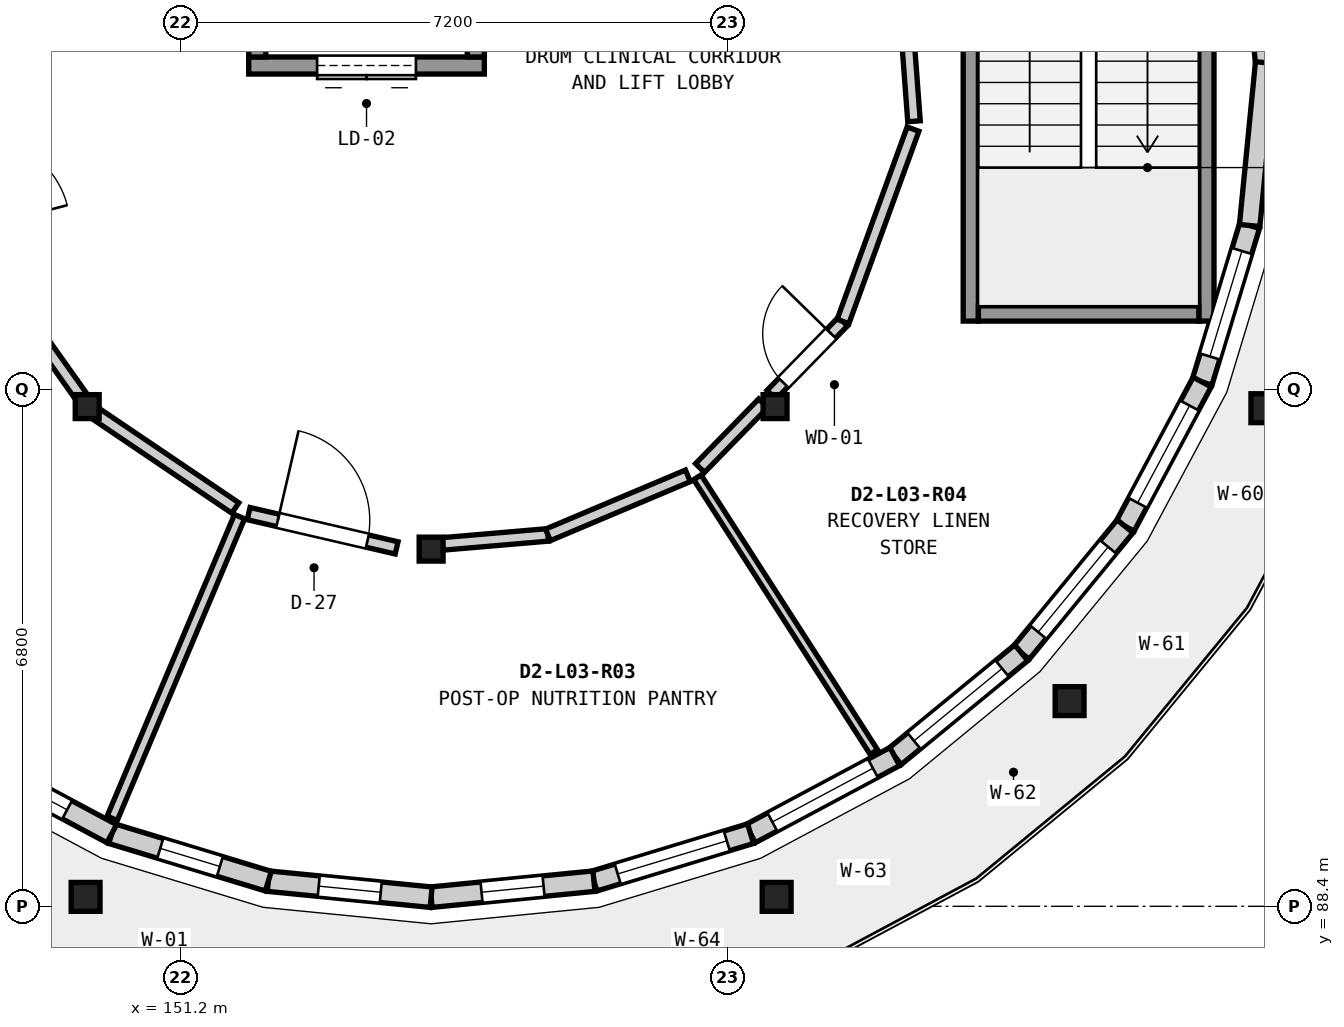
"""IFC4 building model, lengths in metres.
Left out: names, types, materials, properties, quantities, classifications, styles, units other than length and angle.
Written with IfcOpenShell. Run it as: python <this file> out.ifc"""

import sys

from ifc_helpers import new_model, si_unit, direction, frame, frame_2d, origin, origin_2d, place, context, subcontext, project, spatial, rectangle, circle, extrude, element, fill, save


model = new_model("IFC4")
c1 = context("Model", 3, precision=1e-05, world=origin(), true_north=direction((0.0, 1.0)))
c2 = subcontext(c1, "Body", "Model", "MODEL_VIEW")
j1 = project(units=[si_unit("LENGTHUNIT", "METRE"), si_unit("PLANEANGLEUNIT", "RADIAN")], contexts=[c1])
p1 = place(None, origin())
s1 = spatial("IfcSite", under=j1, at=p1, CompositionType="ELEMENT")
p2 = place(p1, origin())
s2 = spatial("IfcBuilding", under=s1, at=p2, CompositionType="ELEMENT")
p3 = place(p2, frame((0.0, 0.0, 12.95)))
s3 = spatial("IfcBuildingStorey", under=s2, at=p3, CompositionType="ELEMENT", Elevation=12.95)
for number, where, z_axis, x_axis in (
    (1, (149.954, 88.524, 0.0), (0.0, 0.0, 1.0), (1.0, 0.0, 0.0)),
    (2, (159.046, 88.524, 0.0), (0.0, 0.0, 1.0), (1.0, 0.0, 0.0)),
    (3, (162.9, 91.1, 0.0), (0.0, 0.0, 1.0), (1.0, 0.0, 0.0)),
    (4, (165.476, 94.954, 0.0), (0.0, 0.0, 1.0), (1.0, 0.0, 0.0)),
):
    element("IfcColumn", number, at=place(p3, frame(where, z_axis=z_axis, x_axis=x_axis)), inside=s3, PredefinedType="PILASTER", context=c2, shape_type="SweptSolid", body=[
        extrude(circle(Radius=0.19, at=origin_2d()), origin(), (0.0, 0.0, 1.0), 4.2),
    ])
for number, where, z_axis, x_axis in (
    (5, (149.975, 94.975, 0.0), (0.0, 0.0, 1.0), (1.0, 0.0, 0.0)),
    (6, (154.5, 93.1, 0.0), (0.0, 0.0, 1.0), (1.0, 0.0, 0.0)),
    (7, (159.025, 94.975, 0.0), (0.0, 0.0, 1.0), (1.0, 0.0, 0.0)),
):
    element("IfcColumn", number, at=place(p3, frame(where, z_axis=z_axis, x_axis=x_axis)), inside=s3, PredefinedType="COLUMN", context=c2, shape_type="SweptSolid", body=[
        extrude(rectangle(XDim=0.315, YDim=0.315, at=origin_2d()), origin(), (0.0, 0.0, 1.0), 4.2),
    ])
p4 = place(p3, frame((165.269, 97.358, 0.0), z_axis=(0.0, 0.0, 1.0), x_axis=(-0.290353644083, -0.95691941216, 0.0)))
e8 = element("IfcWall", 8, at=p4, inside=s3, PredefinedType="ELEMENTEDWALL", context=c2, shape_type="SweptSolid", body=[
    extrude(rectangle(XDim=2.153, YDim=0.27, at=frame_2d((1.076, 0.0))), origin(), (0.0, 0.0, 1.0), 3.314),
])
p5 = place(p4, frame((0.351, 0.0, 0.85)))
e9 = element("IfcOpeningElement", 9, at=p5, cuts=e8, PredefinedType="OPENING", context=c2, shape_type="SweptSolid", body=[
    extrude(rectangle(XDim=1.45, YDim=1.45, at=frame_2d((0.725, 0.725))), frame((0.0, 0.145, 0.0), z_axis=(0.0, -1.0, 0.0), x_axis=(1.0, 0.0, 0.0)), (0.0, 0.0, 1.0), 0.29),
])
p6 = place(p3, frame((164.644, 95.298, 0.0), z_axis=(0.0, 0.0, 1.0), x_axis=(-0.471235784617, -0.882007276215, 0.0)))
e10 = element("IfcWall", 10, at=p6, inside=s3, PredefinedType="ELEMENTEDWALL", context=c2, shape_type="SweptSolid", body=[
    extrude(rectangle(XDim=2.152, YDim=0.27, at=frame_2d((1.076, 0.0))), origin(), (0.0, 0.0, 1.0), 3.314),
])
p7 = place(p6, frame((0.351, 0.0, 0.85)))
e11 = element("IfcOpeningElement", 11, at=p7, cuts=e10, PredefinedType="OPENING", context=c2, shape_type="SweptSolid", body=[
    extrude(rectangle(XDim=1.45, YDim=1.75, at=frame_2d((0.725, 0.875))), frame((0.0, 0.145, 0.0), z_axis=(0.0, -1.0, 0.0), x_axis=(1.0, 0.0, 0.0)), (0.0, 0.0, 1.0), 0.29),
])
p8 = place(p3, frame((163.63, 93.4, 0.0), z_axis=(0.0, 0.0, 1.0), x_axis=(-0.634533827498, -0.772895091045, 0.0)))
e12 = element("IfcWall", 12, at=p8, inside=s3, PredefinedType="ELEMENTEDWALL", context=c2, shape_type="SweptSolid", body=[
    extrude(rectangle(XDim=2.153, YDim=0.27, at=frame_2d((1.076, 0.0))), origin(), (0.0, 0.0, 1.0), 3.314),
])
p9 = place(p8, frame((0.351, 0.0, 0.85)))
e13 = element("IfcOpeningElement", 13, at=p9, cuts=e12, PredefinedType="OPENING", context=c2, shape_type="SweptSolid", body=[
    extrude(rectangle(XDim=1.45, YDim=2.05, at=frame_2d((0.725, 1.025))), frame((0.0, 0.145, 0.0), z_axis=(0.0, -1.0, 0.0), x_axis=(1.0, 0.0, 0.0)), (0.0, 0.0, 1.0), 0.29),
])
p10 = place(p3, frame((162.264, 91.736, 0.0), z_axis=(0.0, 0.0, 1.0), x_axis=(-0.772895091045, -0.634533827498, 0.0)))
e14 = element("IfcWall", 14, at=p10, inside=s3, PredefinedType="ELEMENTEDWALL", context=c2, shape_type="SweptSolid", body=[
    extrude(rectangle(XDim=2.153, YDim=0.27, at=frame_2d((1.076, 0.0))), origin(), (0.0, 0.0, 1.0), 3.314),
])
p11 = place(p10, frame((0.326, 0.0, 0.85)))
e15 = element("IfcOpeningElement", 15, at=p11, cuts=e14, PredefinedType="OPENING", context=c2, shape_type="SweptSolid", body=[
    extrude(rectangle(XDim=1.5, YDim=1.3, at=frame_2d((0.75, 0.65))), frame((0.0, 0.145, 0.0), z_axis=(0.0, -1.0, 0.0), x_axis=(1.0, 0.0, 0.0)), (0.0, 0.0, 1.0), 0.29),
])
p12 = place(p3, frame((160.6, 90.37, 0.0), z_axis=(0.0, 0.0, 1.0), x_axis=(-0.882007276215, -0.471235784617, 0.0)))
e16 = element("IfcWall", 16, at=p12, inside=s3, PredefinedType="ELEMENTEDWALL", context=c2, shape_type="SweptSolid", body=[
    extrude(rectangle(XDim=2.152, YDim=0.27, at=frame_2d((1.076, 0.0))), origin(), (0.0, 0.0, 1.0), 3.314),
])
p13 = place(p12, frame((0.326, 0.0, 0.85)))
e17 = element("IfcOpeningElement", 17, at=p13, cuts=e16, PredefinedType="OPENING", context=c2, shape_type="SweptSolid", body=[
    extrude(rectangle(XDim=1.5, YDim=1.65, at=frame_2d((0.75, 0.825))), frame((0.0, 0.145, 0.0), z_axis=(0.0, -1.0, 0.0), x_axis=(1.0, 0.0, 0.0)), (0.0, 0.0, 1.0), 0.29),
])
p14 = place(p3, frame((158.702, 89.356, 0.0), z_axis=(0.0, 0.0, 1.0), x_axis=(-0.95691941216, -0.290353644083, 0.0)))
e18 = element("IfcWall", 18, at=p14, inside=s3, PredefinedType="ELEMENTEDWALL", context=c2, shape_type="SweptSolid", body=[
    extrude(rectangle(XDim=2.153, YDim=0.27, at=frame_2d((1.076, 0.0))), origin(), (0.0, 0.0, 1.0), 3.314),
])
p15 = place(p14, frame((0.326, 0.0, 0.85)))
e19 = element("IfcOpeningElement", 19, at=p15, cuts=e18, PredefinedType="OPENING", context=c2, shape_type="SweptSolid", body=[
    extrude(rectangle(XDim=1.5, YDim=1.95, at=frame_2d((0.75, 0.975))), frame((0.0, 0.145, 0.0), z_axis=(0.0, -1.0, 0.0), x_axis=(1.0, 0.0, 0.0)), (0.0, 0.0, 1.0), 0.29),
])
p16 = place(p3, frame((156.642, 88.731, 0.0), z_axis=(0.0, 0.0, 1.0), x_axis=(-0.995186536277, -0.097998765368, 0.0)))
e20 = element("IfcWall", 20, at=p16, inside=s3, PredefinedType="ELEMENTEDWALL", context=c2, shape_type="SweptSolid", body=[
    extrude(rectangle(XDim=2.152, YDim=0.27, at=frame_2d((1.076, 0.0))), origin(), (0.0, 0.0, 1.0), 3.314),
])
p17 = place(p16, frame((0.666, 0.0, 0.85)))
e21 = element("IfcOpeningElement", 21, at=p17, cuts=e20, PredefinedType="OPENING", context=c2, shape_type="SweptSolid", body=[
    extrude(rectangle(XDim=0.82, YDim=1.45, at=frame_2d((0.41, 0.725))), frame((0.0, 0.145, 0.0), z_axis=(0.0, -1.0, 0.0), x_axis=(1.0, 0.0, 0.0)), (0.0, 0.0, 1.0), 0.29),
])
p18 = place(p3, frame((154.5, 88.52, 0.0), z_axis=(0.0, 0.0, 1.0), x_axis=(-0.995186536277, 0.097998765368, 0.0)))
e22 = element("IfcWall", 22, at=p18, inside=s3, PredefinedType="ELEMENTEDWALL", context=c2, shape_type="SweptSolid", body=[
    extrude(rectangle(XDim=2.152, YDim=0.27, at=frame_2d((1.076, 0.0))), origin(), (0.0, 0.0, 1.0), 3.314),
])
p19 = place(p18, frame((0.666, 0.0, 0.85)))
e23 = element("IfcOpeningElement", 23, at=p19, cuts=e22, PredefinedType="OPENING", context=c2, shape_type="SweptSolid", body=[
    extrude(rectangle(XDim=0.82, YDim=1.45, at=frame_2d((0.41, 0.725))), frame((0.0, 0.145, 0.0), z_axis=(0.0, -1.0, 0.0), x_axis=(1.0, 0.0, 0.0)), (0.0, 0.0, 1.0), 0.29),
])
p20 = place(p3, frame((152.358, 88.731, 0.0), z_axis=(0.0, 0.0, 1.0), x_axis=(-0.95691941216, 0.290353644083, 0.0)))
e24 = element("IfcWall", 24, at=p20, inside=s3, PredefinedType="ELEMENTEDWALL", context=c2, shape_type="SweptSolid", body=[
    extrude(rectangle(XDim=2.153, YDim=0.27, at=frame_2d((1.076, 0.0))), origin(), (0.0, 0.0, 1.0), 3.314),
])
p21 = place(p20, frame((0.666, 0.0, 0.85)))
e25 = element("IfcOpeningElement", 25, at=p21, cuts=e24, PredefinedType="OPENING", context=c2, shape_type="SweptSolid", body=[
    extrude(rectangle(XDim=0.82, YDim=1.45, at=frame_2d((0.41, 0.725))), frame((0.0, 0.145, 0.0), z_axis=(0.0, -1.0, 0.0), x_axis=(1.0, 0.0, 0.0)), (0.0, 0.0, 1.0), 0.29),
])
p22 = place(p3, frame((150.298, 89.356, 0.0), z_axis=(0.0, 0.0, 1.0), x_axis=(-0.882007276215, 0.471235784617, 0.0)))
e26 = element("IfcWall", 26, at=p22, inside=s3, PredefinedType="ELEMENTEDWALL", context=c2, shape_type="SweptSolid", body=[
    extrude(rectangle(XDim=2.152, YDim=0.27, at=frame_2d((1.076, 0.0))), origin(), (0.0, 0.0, 1.0), 3.314),
])
p23 = place(p22, frame((0.666, 0.0, 0.85)))
e27 = element("IfcOpeningElement", 27, at=p23, cuts=e26, PredefinedType="OPENING", context=c2, shape_type="SweptSolid", body=[
    extrude(rectangle(XDim=0.82, YDim=1.45, at=frame_2d((0.41, 0.725))), frame((0.0, 0.145, 0.0), z_axis=(0.0, -1.0, 0.0), x_axis=(1.0, 0.0, 0.0)), (0.0, 0.0, 1.0), 0.29),
])
for number, where, z_axis, x_axis in (
    (28, (165.269, 101.642, 0.0), (0.0, 0.0, 1.0), (0.098, -0.995, 0.0)),
    (29, (165.48, 99.5, 0.0), (0.0, 0.0, 1.0), (-0.098, -0.995, 0.0)),
):
    element("IfcWall", number, at=place(p3, frame(where, z_axis=z_axis, x_axis=x_axis)), inside=s3, PredefinedType="ELEMENTEDWALL", context=c2, shape_type="SweptSolid", body=[
        extrude(rectangle(XDim=2.152, YDim=0.27, at=frame_2d((1.076, 0.0))), origin(), (0.0, 0.0, 1.0), 3.314),
    ])
p24 = place(p3, frame((161.6, 102.9, 0.0), z_axis=(0.0, 0.0, 1.0), x_axis=(0.0, -1.0, 0.0)))
e30 = element("IfcWall", 30, at=p24, inside=s3, PredefinedType="SHEAR", context=c2, shape_type="SweptSolid", body=[
    extrude(rectangle(XDim=6.8, YDim=0.2, at=frame_2d((3.4, 0.0))), origin(), (0.0, 0.0, 1.0), 3.96),
])
p25 = place(p24, frame((0.38, 0.0, 0.0)))
e31 = element("IfcOpeningElement", 31, at=p25, cuts=e30, PredefinedType="OPENING", context=c2, shape_type="SweptSolid", body=[
    extrude(rectangle(XDim=1.1, YDim=2.15, at=frame_2d((0.55, 1.075))), frame((0.0, 0.11, 0.0), z_axis=(0.0, -1.0, 0.0), x_axis=(1.0, 0.0, 0.0)), (0.0, 0.0, 1.0), 0.22),
])
p26 = place(p3, frame((164.7, 102.9, 0.0), z_axis=(0.0, 0.0, 1.0), x_axis=(0.0, -1.0, 0.0)))
e32 = element("IfcWall", 32, at=p26, inside=s3, PredefinedType="SHEAR", context=c2, shape_type="SweptSolid", body=[
    extrude(rectangle(XDim=6.8, YDim=0.2, at=frame_2d((3.4, 0.0))), origin(), (0.0, 0.0, 1.0), 3.96),
])
p27 = place(p3, frame((161.7, 96.2, 0.0), z_axis=(0.0, 0.0, 1.0), x_axis=(1.0, 0.0, 0.0)))
e33 = element("IfcWall", 33, at=p27, inside=s3, PredefinedType="SHEAR", context=c2, shape_type="SweptSolid", body=[
    extrude(rectangle(XDim=2.9, YDim=0.2, at=frame_2d((1.45, 0.0))), origin(), (0.0, 0.0, 1.0), 3.96),
])
p28 = place(p3, frame((152.1, 99.463, 0.0), z_axis=(0.0, 0.0, 1.0), x_axis=(1.0, 0.0, 0.0)))
e34 = element("IfcWall", 34, at=p28, inside=s3, PredefinedType="SHEAR", context=c2, shape_type="SweptSolid", body=[
    extrude(rectangle(XDim=3.1, YDim=0.225, at=frame_2d((1.55, 0.0))), origin(), (0.0, 0.0, 1.0), 3.96),
])
p29 = place(p28, frame((0.9, 0.0, 0.0)))
e35 = element("IfcOpeningElement", 35, at=p29, cuts=e34, PredefinedType="OPENING", context=c2, shape_type="SweptSolid", body=[
    extrude(rectangle(XDim=1.3, YDim=2.2, at=frame_2d((0.65, 1.1))), frame((0.0, 0.123, 0.0), z_axis=(0.0, -1.0, 0.0), x_axis=(1.0, 0.0, 0.0)), (0.0, 0.0, 1.0), 0.245),
])
for number, where, z_axis, x_axis in (
    (36, (152.213, 99.575, 0.0), (0.0, 0.0, 1.0), (0.0, 1.0, 0.0)),
    (37, (155.088, 99.575, 0.0), (0.0, 0.0, 1.0), (0.0, 1.0, 0.0)),
):
    element("IfcWall", number, at=place(p3, frame(where, z_axis=z_axis, x_axis=x_axis)), inside=s3, PredefinedType="SHEAR", context=c2, shape_type="SweptSolid", body=[
        extrude(rectangle(XDim=2.15, YDim=0.225, at=frame_2d((1.075, 0.0))), origin(), (0.0, 0.0, 1.0), 3.96),
    ])
p30 = place(p3, frame((151.979, 93.527, 0.0), z_axis=(0.0, 0.0, 1.0), x_axis=(-0.388824533624, -0.921311826719, 0.0)))
e38 = element("IfcWall", 38, at=p30, inside=s3, PredefinedType="PARTITIONING", context=c2, shape_type="SweptSolid", body=[
    extrude(rectangle(XDim=4.308, YDim=0.145, at=frame_2d((2.154, 0.0))), origin(), (0.0, 0.0, 1.0), 3.279),
])
p31 = place(p3, frame((158.003, 94.045, 0.0), z_axis=(0.0, 0.0, 1.0), x_axis=(0.540341175476, -0.841446025652, 0.0)))
e39 = element("IfcWall", 39, at=p31, inside=s3, PredefinedType="PARTITIONING", context=c2, shape_type="SweptSolid", body=[
    extrude(rectangle(XDim=4.297, YDim=0.115, at=frame_2d((2.149, 0.0))), origin(), (0.0, 0.0, 1.0), 3.279),
])
p32 = place(p3, frame((148.702, 96.79, 0.0), z_axis=(0.0, 0.0, 1.0), x_axis=(0.578673092917, -0.815559594103, 0.0)))
e40 = element("IfcWall", 40, at=p32, inside=s3, PredefinedType="PARTITIONING", context=c2, shape_type="SweptSolid", body=[
    extrude(rectangle(XDim=2.055, YDim=0.165, at=frame_2d((1.028, 0.0))), origin(), (0.0, 0.0, 1.0), 3.279),
])
p33 = place(p3, frame((150.101, 94.873, 0.0), z_axis=(0.0, 0.0, 1.0), x_axis=(0.828551404548, -0.55991300219, 0.0)))
e41 = element("IfcWall", 41, at=p33, inside=s3, PredefinedType="PARTITIONING", context=c2, shape_type="SweptSolid", body=[
    extrude(rectangle(XDim=2.2, YDim=0.165, at=frame_2d((1.1, 0.0))), origin(), (0.0, 0.0, 1.0), 3.279),
])
p34 = place(p3, frame((152.099, 93.567, 0.0), z_axis=(0.0, 0.0, 1.0), x_axis=(0.97420761257, -0.225653556611, 0.0)))
e42 = element("IfcWall", 42, at=p34, inside=s3, PredefinedType="PARTITIONING", context=c2, shape_type="SweptSolid", body=[
    extrude(rectangle(XDim=1.998, YDim=0.165, at=frame_2d((0.999, 0.0))), origin(), (0.0, 0.0, 1.0), 3.279),
])
p35 = place(p34, frame((0.394, 0.0, 0.0)))
e43 = element("IfcOpeningElement", 43, at=p35, cuts=e42, PredefinedType="OPENING", context=c2, shape_type="SweptSolid", body=[
    extrude(rectangle(XDim=1.21, YDim=2.16, at=frame_2d((0.605, 1.08))), frame((0.0, 0.093, 0.0), z_axis=(0.0, -1.0, 0.0), x_axis=(1.0, 0.0, 0.0)), (0.0, 0.0, 1.0), 0.185),
])
p36 = place(p3, frame((154.647, 93.168, 0.0), z_axis=(0.0, 0.0, 1.0), x_axis=(0.996347499796, 0.085391215297, 0.0)))
e44 = element("IfcWall", 44, at=p36, inside=s3, PredefinedType="PARTITIONING", context=c2, shape_type="SweptSolid", body=[
    extrude(rectangle(XDim=1.395, YDim=0.165, at=frame_2d((0.698, 0.0))), origin(), (0.0, 0.0, 1.0), 3.279),
])
p37 = place(p3, frame((156.037, 93.287, 0.0), z_axis=(0.0, 0.0, 1.0), x_axis=(0.9213176586, 0.38881071481, 0.0)))
e45 = element("IfcWall", 45, at=p37, inside=s3, PredefinedType="PARTITIONING", context=c2, shape_type="SweptSolid", body=[
    extrude(rectangle(XDim=1.998, YDim=0.165, at=frame_2d((0.999, 0.0))), origin(), (0.0, 0.0, 1.0), 3.279),
])
p38 = place(p3, frame((158.038, 94.167, 0.0), z_axis=(0.0, 0.0, 1.0), x_axis=(0.698115930022, 0.715984740235, 0.0)))
e46 = element("IfcWall", 46, at=p38, inside=s3, PredefinedType="PARTITIONING", context=c2, shape_type="SweptSolid", body=[
    extrude(rectangle(XDim=1.189, YDim=0.165, at=frame_2d((0.594, 0.0))), origin(), (0.0, 0.0, 1.0), 3.279),
])
p39 = place(p3, frame((158.978, 95.131, 0.0), z_axis=(0.0, 0.0, 1.0), x_axis=(0.698536724788, 0.715574205881, 0.0)))
e47 = element("IfcWall", 47, at=p39, inside=s3, PredefinedType="PARTITIONING", context=c2, shape_type="SweptSolid", body=[
    extrude(rectangle(XDim=1.347, YDim=0.165, at=frame_2d((0.673, 0.0))), origin(), (0.0, 0.0, 1.0), 3.279),
])
p40 = place(p39, frame((0.223, 0.0, 0.0)))
e48 = element("IfcOpeningElement", 48, at=p40, cuts=e47, PredefinedType="OPENING", context=c2, shape_type="SweptSolid", body=[
    extrude(rectangle(XDim=0.9, YDim=2.1, at=frame_2d((0.45, 1.05))), frame((0.0, 0.093, 0.0), z_axis=(0.0, -1.0, 0.0), x_axis=(1.0, 0.0, 0.0)), (0.0, 0.0, 1.0), 0.185),
])
p41 = place(p3, frame((159.919, 96.095, 0.0), z_axis=(0.0, 0.0, 1.0), x_axis=(0.341997778508, 0.939700760612, 0.0)))
e49 = element("IfcWall", 49, at=p41, inside=s3, PredefinedType="PARTITIONING", context=c2, shape_type="SweptSolid", body=[
    extrude(rectangle(XDim=2.693, YDim=0.165, at=frame_2d((1.347, 0.0))), origin(), (0.0, 0.0, 1.0), 3.279),
])
p42 = place(p3, frame((160.853, 98.729, 0.0), z_axis=(0.0, 0.0, 1.0), x_axis=(-0.074777345003, 0.997200255051, 0.0)))
e50 = element("IfcWall", 50, at=p42, inside=s3, PredefinedType="PARTITIONING", context=c2, shape_type="SweptSolid", body=[
    extrude(rectangle(XDim=1.926, YDim=0.165, at=frame_2d((0.963, 0.0))), origin(), (0.0, 0.0, 1.0), 3.279),
])
p43 = place(p5, origin())
e51 = element("IfcWindow", 51, at=p43, inside=s3, PartitioningType="SINGLE_PANEL", PredefinedType="WINDOW", context=c2, shape_type="SweptSolid", body=[
    extrude(rectangle(XDim=1.45, YDim=1.45, at=frame_2d((0.725, 0.725))), frame((0.0, 0.03, 0.0), z_axis=(0.0, -1.0, 0.0), x_axis=(1.0, 0.0, 0.0)), (0.0, 0.0, 1.0), 0.06),
])
fill(e9, e51)
p44 = place(p7, origin())
e52 = element("IfcWindow", 52, at=p44, inside=s3, PartitioningType="SINGLE_PANEL", PredefinedType="WINDOW", context=c2, shape_type="SweptSolid", body=[
    extrude(rectangle(XDim=1.45, YDim=1.75, at=frame_2d((0.725, 0.875))), frame((0.0, 0.03, 0.0), z_axis=(0.0, -1.0, 0.0), x_axis=(1.0, 0.0, 0.0)), (0.0, 0.0, 1.0), 0.06),
])
fill(e11, e52)
p45 = place(p9, origin())
e53 = element("IfcWindow", 53, at=p45, inside=s3, PartitioningType="SINGLE_PANEL", PredefinedType="WINDOW", context=c2, shape_type="SweptSolid", body=[
    extrude(rectangle(XDim=1.45, YDim=2.05, at=frame_2d((0.725, 1.025))), frame((0.0, 0.03, 0.0), z_axis=(0.0, -1.0, 0.0), x_axis=(1.0, 0.0, 0.0)), (0.0, 0.0, 1.0), 0.06),
])
fill(e13, e53)
p46 = place(p11, origin())
e54 = element("IfcWindow", 54, at=p46, inside=s3, PartitioningType="SINGLE_PANEL", PredefinedType="WINDOW", context=c2, shape_type="SweptSolid", body=[
    extrude(rectangle(XDim=1.5, YDim=1.3, at=frame_2d((0.75, 0.65))), frame((0.0, 0.03, 0.0), z_axis=(0.0, -1.0, 0.0), x_axis=(1.0, 0.0, 0.0)), (0.0, 0.0, 1.0), 0.06),
])
fill(e15, e54)
p47 = place(p13, origin())
e55 = element("IfcWindow", 55, at=p47, inside=s3, PartitioningType="SINGLE_PANEL", PredefinedType="WINDOW", context=c2, shape_type="SweptSolid", body=[
    extrude(rectangle(XDim=1.5, YDim=1.65, at=frame_2d((0.75, 0.825))), frame((0.0, 0.03, 0.0), z_axis=(0.0, -1.0, 0.0), x_axis=(1.0, 0.0, 0.0)), (0.0, 0.0, 1.0), 0.06),
])
fill(e17, e55)
p48 = place(p15, origin())
e56 = element("IfcWindow", 56, at=p48, inside=s3, PartitioningType="SINGLE_PANEL", PredefinedType="WINDOW", context=c2, shape_type="SweptSolid", body=[
    extrude(rectangle(XDim=1.5, YDim=1.95, at=frame_2d((0.75, 0.975))), frame((0.0, 0.03, 0.0), z_axis=(0.0, -1.0, 0.0), x_axis=(1.0, 0.0, 0.0)), (0.0, 0.0, 1.0), 0.06),
])
fill(e19, e56)
p49 = place(p17, origin())
e57 = element("IfcWindow", 57, at=p49, inside=s3, PartitioningType="SINGLE_PANEL", PredefinedType="WINDOW", context=c2, shape_type="SweptSolid", body=[
    extrude(rectangle(XDim=0.82, YDim=1.45, at=frame_2d((0.41, 0.725))), frame((0.0, 0.03, 0.0), z_axis=(0.0, -1.0, 0.0), x_axis=(1.0, 0.0, 0.0)), (0.0, 0.0, 1.0), 0.06),
])
fill(e21, e57)
p50 = place(p19, origin())
e58 = element("IfcWindow", 58, at=p50, inside=s3, PartitioningType="SINGLE_PANEL", PredefinedType="WINDOW", context=c2, shape_type="SweptSolid", body=[
    extrude(rectangle(XDim=0.82, YDim=1.45, at=frame_2d((0.41, 0.725))), frame((0.0, 0.03, 0.0), z_axis=(0.0, -1.0, 0.0), x_axis=(1.0, 0.0, 0.0)), (0.0, 0.0, 1.0), 0.06),
])
fill(e23, e58)
p51 = place(p21, origin())
e59 = element("IfcWindow", 59, at=p51, inside=s3, PartitioningType="SINGLE_PANEL", PredefinedType="WINDOW", context=c2, shape_type="SweptSolid", body=[
    extrude(rectangle(XDim=0.82, YDim=1.45, at=frame_2d((0.41, 0.725))), frame((0.0, 0.03, 0.0), z_axis=(0.0, -1.0, 0.0), x_axis=(1.0, 0.0, 0.0)), (0.0, 0.0, 1.0), 0.06),
])
fill(e25, e59)
p52 = place(p23, origin())
e60 = element("IfcWindow", 60, at=p52, inside=s3, PartitioningType="SINGLE_PANEL", PredefinedType="WINDOW", context=c2, shape_type="SweptSolid", body=[
    extrude(rectangle(XDim=0.82, YDim=1.45, at=frame_2d((0.41, 0.725))), frame((0.0, 0.03, 0.0), z_axis=(0.0, -1.0, 0.0), x_axis=(1.0, 0.0, 0.0)), (0.0, 0.0, 1.0), 0.06),
])
fill(e27, e60)
p53 = place(p29, origin())
e61 = element("IfcDoor", 61, at=p53, inside=s3, OperationType="DOUBLE_DOOR_SLIDING", PredefinedType="DOOR", context=c2, shape_type="SweptSolid", body=[
    extrude(rectangle(XDim=1.3, YDim=2.2, at=frame_2d((0.65, 1.1))), frame((0.0, 0.025, 0.0), z_axis=(0.0, -1.0, 0.0), x_axis=(1.0, 0.0, 0.0)), (0.0, 0.0, 1.0), 0.05),
])
fill(e35, e61)
p54 = place(p35, origin())
e62 = element("IfcDoor", 62, at=p54, inside=s3, OperationType="SINGLE_SWING_LEFT", PredefinedType="DOOR", context=c2, shape_type="SweptSolid", body=[
    extrude(rectangle(XDim=1.21, YDim=2.16, at=frame_2d((0.605, 1.08))), frame((0.0, 0.025, 0.0), z_axis=(0.0, -1.0, 0.0), x_axis=(1.0, 0.0, 0.0)), (0.0, 0.0, 1.0), 0.05),
])
fill(e43, e62)
p55 = place(p40, origin())
e63 = element("IfcDoor", 63, at=p55, inside=s3, OperationType="SINGLE_SWING_RIGHT", PredefinedType="DOOR", context=c2, shape_type="SweptSolid", body=[
    extrude(rectangle(XDim=0.9, YDim=2.1, at=frame_2d((0.45, 1.05))), frame((0.0, 0.025, 0.0), z_axis=(0.0, -1.0, 0.0), x_axis=(1.0, 0.0, 0.0)), (0.0, 0.0, 1.0), 0.05),
])
fill(e48, e63)
save(model, sys.argv[1])
